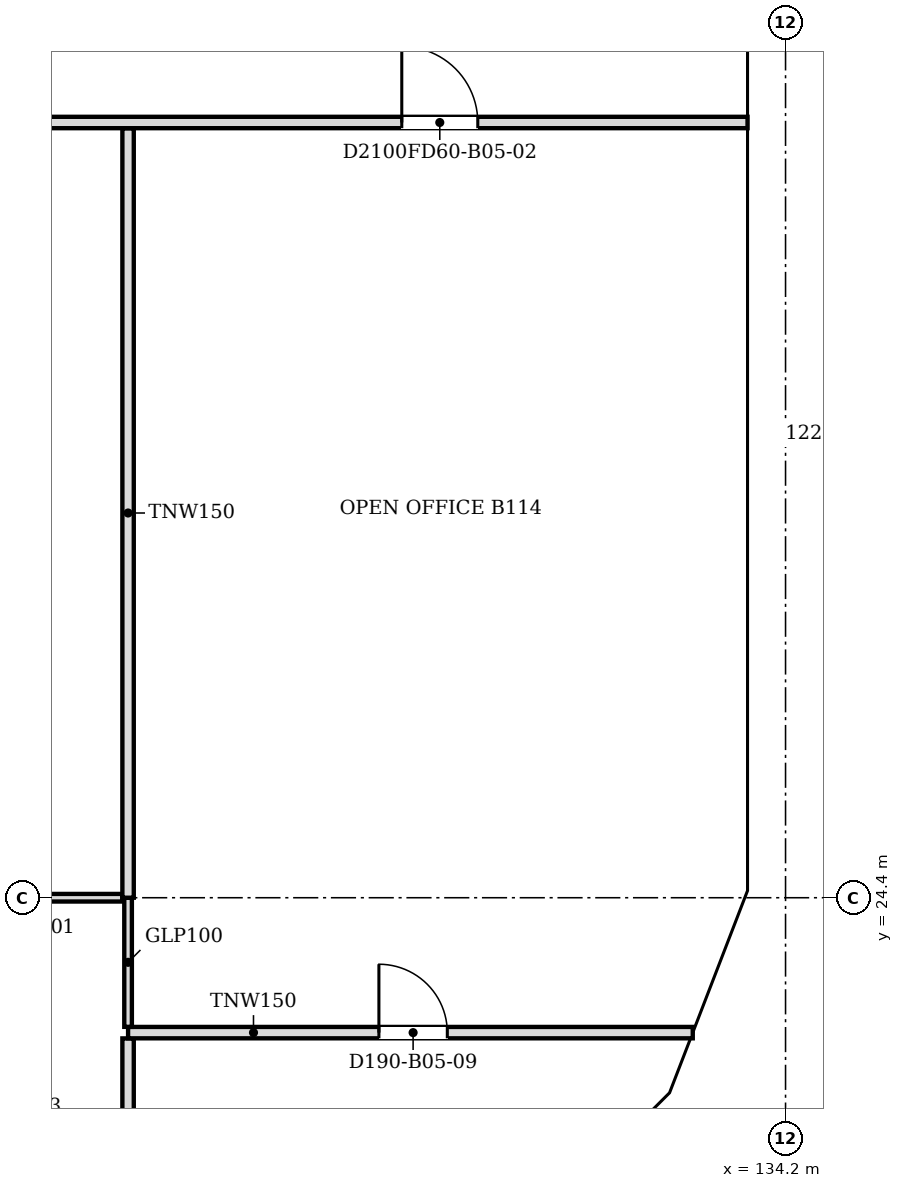
"""IFC4 building model, lengths in metres.
Left out: names, types, materials, properties, quantities, classifications, styles, units other than length and angle.
Written with IfcOpenShell. Run it as: python <this file> out.ifc"""

import sys

from ifc_helpers import new_model, si_unit, direction, frame, frame_2d, origin, place, context, subcontext, project, spatial, polyline, rectangle, outline, extrude, faceted_brep, source, transform, mapped, element, fill, save


model = new_model("IFC4")
c1 = context("Model", 3, precision=1e-05, world=origin(), true_north=direction((0.0, 1.0)))
c2 = subcontext(c1, "Body", "Model", "MODEL_VIEW")
j1 = project(units=[si_unit("LENGTHUNIT", "METRE"), si_unit("PLANEANGLEUNIT", "RADIAN")], contexts=[c1])
p1 = place(None, origin())
s1 = spatial("IfcSite", under=j1, at=p1, CompositionType="ELEMENT")
p2 = place(p1, origin())
s2 = spatial("IfcBuilding", under=s1, at=p2, CompositionType="ELEMENT")
p3 = place(p2, frame((0.0, 0.0, 48.6)))
s3 = spatial("IfcBuildingStorey", under=s2, at=p3, CompositionType="ELEMENT", Elevation=48.6)
m1 = source(origin(), c2, "Body", "Brep", [
    faceted_brep([(2.944, -0.25, 0.0), (2.997, -0.25, 0.068), (2.997, -0.25, 7.532), (2.944, -0.25, 7.6), (0.0, -0.25, 3.8), (0.053, 0.25, 3.868), (2.891, 0.25, 7.532), (2.891, 0.25, 0.068), (0.053, 0.25, 3.732), (2.944, 0.0, 0.0), (2.944, 0.0, 7.6), (0.0, 0.0, 3.8)], [[[0, 1, 2, 3, 4]], [[5, 6, 7, 8]], [[1, 0, 9]], [[10, 3, 2]], [[6, 5, 11, 4, 3, 10]], [[8, 7, 9, 0, 4, 11]], [[8, 11, 5]], [[1, 9, 7, 6, 10, 2]]]),
])
p4 = place(p3, frame((130.806, 19.612, -3.8), z_axis=(0.0, 0.0, 1.0), x_axis=(0.707106781187, 0.707106781187, 0.0)))
e1 = element("IfcWall", 1, at=p4, inside=s3, PredefinedType="SOLIDWALL", context=c2, shape_type="MappedRepresentation", body=[
    mapped(m1, transform((0.0, 0.0, 0.0), scale=1.0)),
])
m2 = source(origin(), c2, "Body", "SweptSolid", [
    extrude(outline(polyline([(2.744, 6.934), (0.316, 3.8), (2.744, 0.666), (2.744, 6.934)])), frame((0.0, 0.26, 0.0), z_axis=(0.0, -1.0, 0.0), x_axis=(1.0, 0.0, 0.0)), (0.0, 0.0, 1.0), 0.52),
])
p5 = place(p4, origin())
e2 = element("IfcOpeningElement", 2, at=p5, cuts=e1, PredefinedType="OPENING", context=c2, shape_type="MappedRepresentation", body=[
    mapped(m2, transform((0.0, 0.0, 0.0), scale=1.0)),
])
m3 = source(origin(), c2, "Body", "Brep", [
    faceted_brep([(0.053, -0.25, 0.0), (3.003, -0.25, 3.8), (0.053, -0.25, 7.6), (0.0, -0.25, 7.531), (0.0, -0.25, 0.068), (0.106, 0.25, 7.532), (2.957, 0.25, 3.86), (2.957, 0.25, 3.74), (0.106, 0.25, 0.068), (3.003, 0.0, 3.8), (0.053, 0.0, 0.0), (0.053, 0.0, 7.6)], [[[0, 1, 2, 3, 4]], [[5, 6, 7, 8]], [[8, 7, 9, 1, 0, 10]], [[6, 5, 11, 2, 1, 9]], [[3, 2, 11]], [[10, 0, 4]], [[8, 10, 4, 3, 11, 5]], [[7, 6, 9]]]),
])
p6 = place(p3, frame((132.869, 21.644, -3.8), z_axis=(0.0, 0.0, 1.0), x_axis=(0.359855894603, 0.933007896601, 0.0)))
e3 = element("IfcWall", 3, at=p6, inside=s3, PredefinedType="SOLIDWALL", context=c2, shape_type="MappedRepresentation", body=[
    mapped(m3, transform((0.0, 0.0, 0.0), scale=1.0)),
])
m4 = source(origin(), c2, "Body", "SweptSolid", [
    extrude(outline(polyline([(0.253, 0.665), (2.687, 3.8), (0.253, 6.935), (0.253, 0.665)])), frame((0.0, 0.26, 0.0), z_axis=(0.0, -1.0, 0.0), x_axis=(1.0, 0.0, 0.0)), (0.0, 0.0, 1.0), 0.52),
])
p7 = place(p6, origin())
e4 = element("IfcOpeningElement", 4, at=p7, cuts=e3, PredefinedType="OPENING", context=c2, shape_type="MappedRepresentation", body=[
    mapped(m4, transform((0.0, 0.0, 0.0), scale=1.0)),
])
m5 = source(origin(), c2, "Body", "Brep", [
    faceted_brep([(3.003, -0.25, 0.0), (6.053, -0.25, 3.8), (3.003, -0.25, 7.6), (0.0, -0.25, 3.8), (0.047, 0.25, 3.859), (3.003, 0.25, 7.6), (6.053, 0.25, 3.8), (3.003, 0.25, 0.0), (0.047, 0.25, 3.741), (0.0, 0.0, 3.8)], [[[0, 1, 2, 3]], [[4, 5, 6, 7, 8]], [[7, 6, 1, 0]], [[6, 5, 2, 1]], [[5, 4, 9, 3, 2]], [[8, 7, 0, 3, 9]], [[8, 9, 4]]]),
])
p8 = place(p3, frame((133.95, 24.447, -3.8), z_axis=(0.0, 0.0, 1.0), x_axis=(0.0, 1.0, 0.0)))
e5 = element("IfcWall", 5, at=p8, inside=s3, PredefinedType="SOLIDWALL", context=c2, shape_type="MappedRepresentation", body=[
    mapped(m5, transform((0.0, 0.0, 0.0), scale=1.0)),
])
m6 = source(origin(), c2, "Body", "SweptSolid", [
    extrude(outline(polyline([(3.005, 0.401), (5.733, 3.8), (3.005, 7.199), (0.319, 3.8), (3.005, 0.401)])), frame((0.0, 0.26, 0.0), z_axis=(0.0, -1.0, 0.0), x_axis=(1.0, 0.0, 0.0)), (0.0, 0.0, 1.0), 0.52),
])
p9 = place(p8, origin())
e6 = element("IfcOpeningElement", 6, at=p9, cuts=e5, PredefinedType="OPENING", context=c2, shape_type="MappedRepresentation", body=[
    mapped(m6, transform((0.0, 0.0, 0.0), scale=1.0)),
])
m7 = source(origin(), c2, "Body", "SweptSolid", [
    extrude(outline(polyline([(3.05, 0.0), (6.1, 3.8), (3.05, 7.6), (0.0, 3.8), (3.05, 0.0)])), frame((0.0, 0.25, 0.0), z_axis=(0.0, -1.0, 0.0), x_axis=(1.0, 0.0, 0.0)), (0.0, 0.0, 1.0), 0.5),
])
p10 = place(p3, frame((133.95, 30.5, -3.8), z_axis=(0.0, 0.0, 1.0), x_axis=(0.0, 1.0, 0.0)))
e7 = element("IfcWall", 7, at=p10, inside=s3, PredefinedType="SOLIDWALL", context=c2, shape_type="MappedRepresentation", body=[
    mapped(m7, transform((0.0, 0.0, 0.0), scale=1.0)),
])
m8 = source(origin(), c2, "Body", "SweptSolid", [
    extrude(outline(polyline([(3.05, 0.399), (5.78, 3.8), (3.05, 7.2), (0.321, 3.8), (3.05, 0.399)])), frame((0.0, 0.26, 0.0), z_axis=(0.0, -1.0, 0.0), x_axis=(1.0, 0.0, 0.0)), (0.0, 0.0, 1.0), 0.52),
])
p11 = place(p10, origin())
e8 = element("IfcOpeningElement", 8, at=p11, cuts=e7, PredefinedType="OPENING", context=c2, shape_type="MappedRepresentation", body=[
    mapped(m8, transform((0.0, 0.0, 0.0), scale=1.0)),
])
p12 = place(p2, frame((0.0, 0.0, 52.4)))
s4 = spatial("IfcBuildingStorey", under=s2, at=p12, CompositionType="ELEMENT", Elevation=52.4)
m9 = source(origin(), c2, "Body", "Brep", [
    faceted_brep([(0.053, -0.25, 0.0), (2.997, -0.25, 3.8), (0.053, -0.25, 7.6), (0.0, -0.25, 7.532), (0.0, -0.25, 0.068), (0.106, 0.25, 7.531), (2.944, 0.25, 3.868), (2.944, 0.25, 3.732), (0.106, 0.25, 0.068), (2.997, 0.0, 3.8), (0.053, 0.0, 0.0), (0.053, 0.0, 7.6)], [[[0, 1, 2, 3, 4]], [[5, 6, 7, 8]], [[8, 7, 9, 1, 0, 10]], [[6, 5, 11, 2, 1, 9]], [[3, 2, 11]], [[10, 0, 4]], [[8, 10, 4, 3, 11, 5]], [[9, 7, 6]]]),
])
p13 = place(p12, frame((130.769, 19.574, -3.8), z_axis=(0.0, 0.0, 1.0), x_axis=(0.707106781187, 0.707106781187, 0.0)))
e9 = element("IfcWall", 9, at=p13, inside=s4, PredefinedType="SOLIDWALL", context=c2, shape_type="MappedRepresentation", body=[
    mapped(m9, transform((0.0, 0.0, 0.0), scale=1.0)),
])
m10 = source(origin(), c2, "Body", "SweptSolid", [
    extrude(outline(polyline([(0.253, 0.666), (2.681, 3.8), (0.253, 6.934), (0.253, 0.666)])), frame((0.0, 0.26, 0.0), z_axis=(0.0, -1.0, 0.0), x_axis=(1.0, 0.0, 0.0)), (0.0, 0.0, 1.0), 0.52),
])
p14 = place(p13, origin())
e10 = element("IfcOpeningElement", 10, at=p14, cuts=e9, PredefinedType="OPENING", context=c2, shape_type="MappedRepresentation", body=[
    mapped(m10, transform((0.0, 0.0, 0.0), scale=1.0)),
])
m11 = source(origin(), c2, "Body", "Brep", [
    faceted_brep([(2.95, -0.25, 0.0), (2.997, -0.25, 0.059), (2.997, -0.25, 7.541), (2.95, -0.25, 7.6), (0.0, -0.25, 3.8), (0.053, 0.25, 3.868), (2.904, 0.25, 7.54), (2.904, 0.25, 0.06), (0.053, 0.25, 3.732), (2.95, 0.0, 0.0), (2.95, 0.0, 7.6), (0.0, 0.0, 3.8)], [[[0, 1, 2, 3, 4]], [[5, 6, 7, 8]], [[1, 0, 9]], [[10, 3, 2]], [[6, 5, 11, 4, 3, 10]], [[8, 7, 9, 0, 4, 11]], [[8, 11, 5]], [[1, 9, 7, 6, 10, 2]]]),
])
p15 = place(p12, frame((132.888, 21.694, -3.8), z_axis=(0.0, 0.0, 1.0), x_axis=(0.359901446078, 0.932990326376, 0.0)))
e11 = element("IfcWall", 11, at=p15, inside=s4, PredefinedType="SOLIDWALL", context=c2, shape_type="MappedRepresentation", body=[
    mapped(m11, transform((0.0, 0.0, 0.0), scale=1.0)),
])
m12 = source(origin(), c2, "Body", "SweptSolid", [
    extrude(outline(polyline([(2.75, 6.935), (0.316, 3.8), (2.75, 0.665), (2.75, 6.935)])), frame((0.0, 0.26, 0.0), z_axis=(0.0, -1.0, 0.0), x_axis=(1.0, 0.0, 0.0)), (0.0, 0.0, 1.0), 0.52),
])
p16 = place(p15, origin())
e12 = element("IfcOpeningElement", 12, at=p16, cuts=e11, PredefinedType="OPENING", context=c2, shape_type="MappedRepresentation", body=[
    mapped(m12, transform((0.0, 0.0, 0.0), scale=1.0)),
])
m13 = source(origin(), c2, "Body", "Brep", [
    faceted_brep([(0.047, -0.25, 0.0), (3.05, -0.25, 3.8), (0.047, -0.25, 7.6), (0.0, -0.25, 7.54), (0.0, -0.25, 0.06), (0.093, 0.25, 7.541), (3.05, 0.25, 3.8), (0.093, 0.25, 0.059), (0.047, 0.0, 0.0), (0.047, 0.0, 7.6)], [[[0, 1, 2, 3, 4]], [[5, 6, 7]], [[7, 6, 1, 0, 8]], [[6, 5, 9, 2, 1]], [[3, 2, 9]], [[8, 0, 4]], [[7, 8, 4, 3, 9, 5]]]),
])
p17 = place(p12, frame((133.95, 24.4, -3.8), z_axis=(0.0, 0.0, 1.0), x_axis=(0.0, 1.0, 0.0)))
e13 = element("IfcWall", 13, at=p17, inside=s4, PredefinedType="SOLIDWALL", context=c2, shape_type="MappedRepresentation", body=[
    mapped(m13, transform((0.0, 0.0, 0.0), scale=1.0)),
])
m14 = source(origin(), c2, "Body", "SweptSolid", [
    extrude(outline(polyline([(0.247, 0.656), (2.731, 3.8), (0.247, 6.944), (0.247, 0.656)])), frame((0.0, 0.26, 0.0), z_axis=(0.0, -1.0, 0.0), x_axis=(1.0, 0.0, 0.0)), (0.0, 0.0, 1.0), 0.52),
])
p18 = place(p17, origin())
e14 = element("IfcOpeningElement", 14, at=p18, cuts=e13, PredefinedType="OPENING", context=c2, shape_type="MappedRepresentation", body=[
    mapped(m14, transform((0.0, 0.0, 0.0), scale=1.0)),
])
m15 = source(origin(), c2, "Body", "SweptSolid", [
    extrude(outline(polyline([(3.05, 0.0), (6.1, 3.8), (3.05, 7.6), (0.0, 3.8), (3.05, 0.0)])), frame((0.0, 0.25, 0.0), z_axis=(0.0, -1.0, 0.0), x_axis=(1.0, 0.0, 0.0)), (0.0, 0.0, 1.0), 0.5),
])
p19 = place(p12, frame((133.95, 27.45, -3.8), z_axis=(0.0, 0.0, 1.0), x_axis=(0.0, 1.0, 0.0)))
e15 = element("IfcWall", 15, at=p19, inside=s4, PredefinedType="SOLIDWALL", context=c2, shape_type="MappedRepresentation", body=[
    mapped(m15, transform((0.0, 0.0, 0.0), scale=1.0)),
])
m16 = source(origin(), c2, "Body", "SweptSolid", [
    extrude(outline(polyline([(3.05, 0.399), (5.78, 3.8), (3.05, 7.2), (0.321, 3.8), (3.05, 0.399)])), frame((0.0, 0.26, 0.0), z_axis=(0.0, -1.0, 0.0), x_axis=(1.0, 0.0, 0.0)), (0.0, 0.0, 1.0), 0.52),
])
p20 = place(p19, origin())
e16 = element("IfcOpeningElement", 16, at=p20, cuts=e15, PredefinedType="OPENING", context=c2, shape_type="MappedRepresentation", body=[
    mapped(m16, transform((0.0, 0.0, 0.0), scale=1.0)),
])
m17 = source(origin(), c2, "Body", "Brep", [
    faceted_brep([(3.05, -0.25, 0.0), (6.1, -0.25, 3.8), (6.1, -0.25, 3.8), (3.05, -0.25, 7.6), (0.0, -0.25, 3.8), (0.0, 0.25, 3.8), (3.05, 0.25, 7.6), (6.1, 0.25, 3.8), (6.1, 0.25, 3.8), (3.05, 0.25, 0.0)], [[[0, 1, 2, 3, 4]], [[5, 6, 7, 8, 9]], [[9, 8, 1, 0]], [[7, 6, 3, 2]], [[6, 5, 4, 3]], [[5, 9, 0, 4]], [[1, 8, 7, 2]]]),
])
p21 = place(p12, frame((133.95, 33.55, -3.8), z_axis=(0.0, 0.0, 1.0), x_axis=(0.0, 1.0, 0.0)))
e17 = element("IfcWall", 17, at=p21, inside=s4, PredefinedType="SOLIDWALL", context=c2, shape_type="MappedRepresentation", body=[
    mapped(m17, transform((0.0, 0.0, 0.0), scale=1.0)),
])
p22 = place(p21, origin())
e18 = element("IfcOpeningElement", 18, at=p22, cuts=e17, PredefinedType="OPENING", context=c2, shape_type="MappedRepresentation", body=[
    mapped(m16, transform((0.0, 0.0, 0.0), scale=1.0)),
])
p23 = place(p3, frame((125.55, 18.8, 0.0), z_axis=(0.0, 0.0, 1.0), x_axis=(0.0, 1.0, 0.0)))
e19 = element("IfcWall", 19, at=p23, inside=s3, PredefinedType="PARTITIONING", context=c2, shape_type="SweptSolid", body=[
    extrude(rectangle(XDim=3.749, YDim=0.15, at=frame_2d((1.875, 0.0))), origin(), (0.0, 0.0, 1.0), 3.067),
])
p24 = place(p3, frame((132.979, 22.625, 0.0), z_axis=(0.0, 0.0, 1.0), x_axis=(-1.0, 0.0, 0.0)))
e20 = element("IfcWall", 20, at=p24, inside=s3, PredefinedType="PARTITIONING", context=c2, shape_type="SweptSolid", body=[
    extrude(rectangle(XDim=7.429, YDim=0.15, at=frame_2d((3.715, 0.0))), origin(), (0.0, 0.0, 1.0), 3.067),
])
m18 = source(origin(), c2, "Body", "SweptSolid", [
    extrude(rectangle(XDim=0.9, YDim=2.1, at=frame_2d((0.45, 1.05))), frame((0.0, 0.085, 0.0), z_axis=(0.0, -1.0, 0.0), x_axis=(1.0, 0.0, 0.0)), (0.0, 0.0, 1.0), 0.17),
])
p25 = place(p24, frame((3.229, 0.0, 0.0)))
e21 = element("IfcOpeningElement", 21, at=p25, cuts=e20, PredefinedType="OPENING", context=c2, shape_type="MappedRepresentation", body=[
    mapped(m18, transform((0.0, 0.0, 0.0), scale=1.0)),
])
p26 = place(p3, frame((125.55, 22.701, 0.0), z_axis=(0.0, 0.0, 1.0), x_axis=(0.0, 1.0, 0.0)))
e22 = element("IfcWall", 22, at=p26, inside=s3, PredefinedType="PARTITIONING", context=c2, shape_type="SweptSolid", body=[
    extrude(rectangle(XDim=1.698, YDim=0.1, at=frame_2d((0.849, 0.0))), origin(), (0.0, 0.0, 1.0), 3.067),
])
p27 = place(p3, frame((125.474, 24.4, 0.0), z_axis=(0.0, 0.0, 1.0), x_axis=(-1.0, 0.0, 0.0)))
e23 = element("IfcWall", 23, at=p27, inside=s3, PredefinedType="PARTITIONING", context=c2, shape_type="SweptSolid", body=[
    extrude(rectangle(XDim=3.023, YDim=0.1, at=frame_2d((1.512, 0.0))), origin(), (0.0, 0.0, 1.0), 3.067),
])
m19 = source(origin(), c2, "Body", "SweptSolid", [
    extrude(rectangle(XDim=0.9, YDim=2.1, at=frame_2d((0.45, 1.05))), frame((0.0, 0.06, 0.0), z_axis=(0.0, -1.0, 0.0), x_axis=(1.0, 0.0, 0.0)), (0.0, 0.0, 1.0), 0.12),
])
p28 = place(p27, frame((1.023, 0.0, 0.0)))
e24 = element("IfcOpeningElement", 24, at=p28, cuts=e23, PredefinedType="OPENING", context=c2, shape_type="MappedRepresentation", body=[
    mapped(m19, transform((0.0, 0.0, 0.0), scale=1.0)),
])
p29 = place(p3, frame((125.55, 24.4, 0.0), z_axis=(0.0, 0.0, 1.0), x_axis=(0.0, 1.0, 0.0)))
e25 = element("IfcWall", 25, at=p29, inside=s3, PredefinedType="PARTITIONING", context=c2, shape_type="SweptSolid", body=[
    extrude(rectangle(XDim=10.124, YDim=0.15, at=frame_2d((5.062, 0.0))), origin(), (0.0, 0.0, 1.0), 3.067),
])
p30 = place(p3, frame((133.7, 34.6, 0.0), z_axis=(0.0, 0.0, 1.0), x_axis=(-1.0, 0.0, 0.0)))
e26 = element("IfcWall", 26, at=p30, inside=s3, PredefinedType="PARTITIONING", context=c2, shape_type="SweptSolid", body=[
    extrude(rectangle(XDim=47.8, YDim=0.15, at=frame_2d((23.9, 0.0))), origin(), (0.0, 0.0, 1.0), 3.067),
])
m20 = source(origin(), c2, "Body", "SweptSolid", [
    extrude(rectangle(XDim=1.0, YDim=2.1, at=frame_2d((0.5, 1.05))), frame((0.0, 0.085, 0.0), z_axis=(0.0, -1.0, 0.0), x_axis=(1.0, 0.0, 0.0)), (0.0, 0.0, 1.0), 0.17),
])
p31 = place(p30, frame((3.549, 0.0, 0.0)))
e27 = element("IfcOpeningElement", 27, at=p31, cuts=e26, PredefinedType="OPENING", context=c2, shape_type="MappedRepresentation", body=[
    mapped(m20, transform((0.0, 0.0, 0.0), scale=1.0)),
])
p32 = place(p30, frame((42.7, 0.0, 0.0)))
e28 = element("IfcOpeningElement", 28, at=p32, cuts=e26, PredefinedType="OPENING", context=c2, shape_type="MappedRepresentation", body=[
    mapped(m20, transform((0.0, 0.0, 0.0), scale=1.0)),
])
p33 = place(p30, frame((12.299, 0.0, 0.0)))
e29 = element("IfcOpeningElement", 29, at=p33, cuts=e26, PredefinedType="OPENING", context=c2, shape_type="MappedRepresentation", body=[
    mapped(m18, transform((0.0, 0.0, 0.0), scale=1.0)),
])
p34 = place(p30, frame((21.349, 0.0, 0.0)))
e30 = element("IfcOpeningElement", 30, at=p34, cuts=e26, PredefinedType="OPENING", context=c2, shape_type="MappedRepresentation", body=[
    mapped(m20, transform((0.0, 0.0, 0.0), scale=1.0)),
])
p35 = place(p30, frame((32.05, 0.0, 0.0)))
e31 = element("IfcOpeningElement", 31, at=p35, cuts=e26, PredefinedType="OPENING", context=c2, shape_type="MappedRepresentation", body=[
    mapped(m20, transform((0.0, 0.0, 0.0), scale=1.0)),
])
m21 = source(origin(), c2, "Body", "SweptSolid", [
    extrude(rectangle(XDim=0.9, YDim=2.1, at=frame_2d((0.45, 1.05))), frame((0.0, 0.025, 0.0), z_axis=(0.0, -1.0, 0.0), x_axis=(1.0, 0.0, 0.0)), (0.0, 0.0, 1.0), 0.05),
])
p36 = place(p25, origin())
e32 = element("IfcDoor", 32, at=p36, inside=s3, OperationType="SINGLE_SWING_RIGHT", PredefinedType="DOOR", context=c2, shape_type="MappedRepresentation", body=[
    mapped(m21, transform((0.0, 0.0, 0.0), scale=1.0)),
])
fill(e21, e32)
m22 = source(origin(), c2, "Body", "SweptSolid", [
    extrude(rectangle(XDim=1.0, YDim=2.1, at=frame_2d((0.5, 1.05))), frame((0.0, 0.025, 0.0), z_axis=(0.0, -1.0, 0.0), x_axis=(1.0, 0.0, 0.0)), (0.0, 0.0, 1.0), 0.05),
])
p37 = place(p31, origin())
e33 = element("IfcDoor", 33, at=p37, inside=s3, OperationType="SINGLE_SWING_RIGHT", PredefinedType="DOOR", context=c2, shape_type="MappedRepresentation", body=[
    mapped(m22, transform((0.0, 0.0, 0.0), scale=1.0)),
])
fill(e27, e33)
save(model, sys.argv[1])
